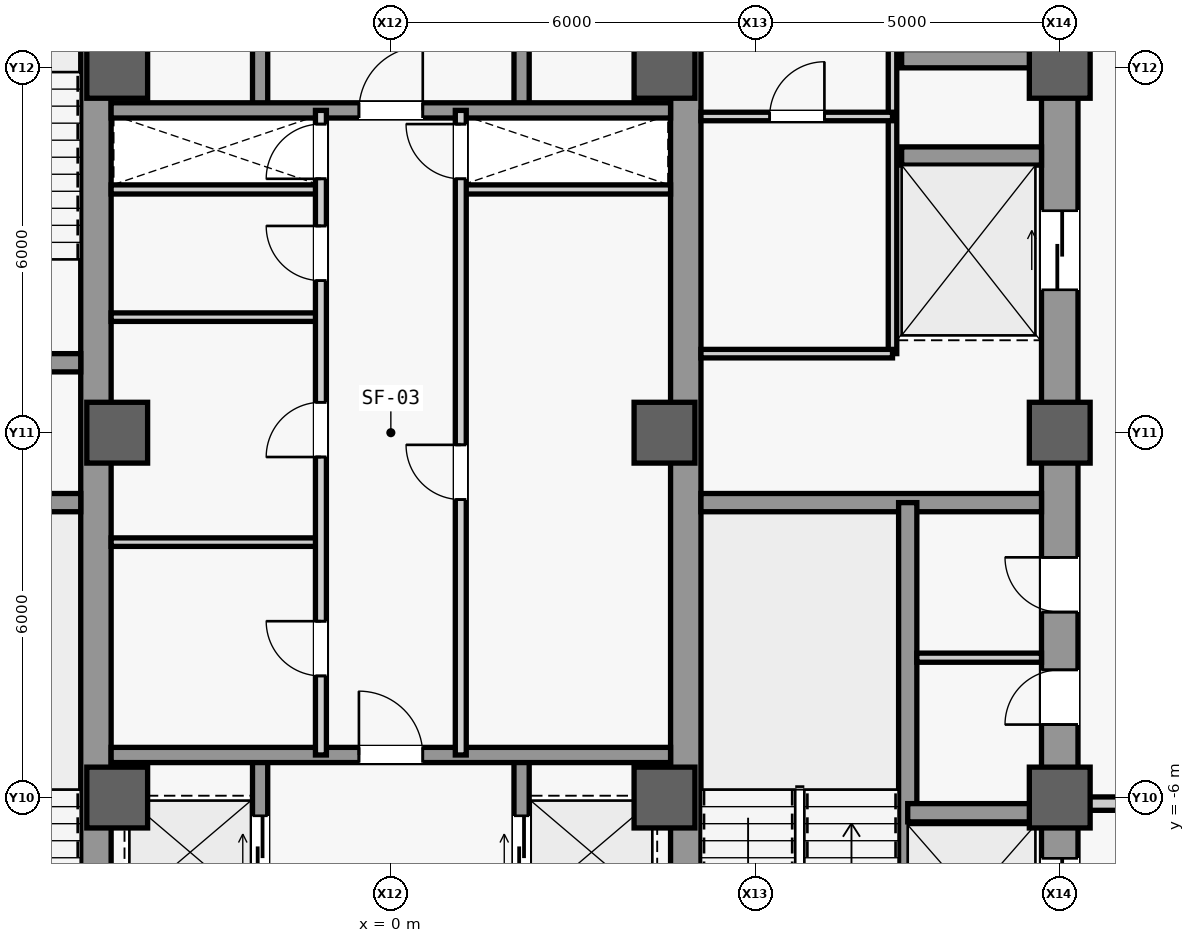
"""IFC4 building model, lengths in metres.
Left out: names, types, materials, properties, quantities, classifications, styles, units other than length and angle.
Written with IfcOpenShell. Run it as: python <this file> out.ifc"""

import sys

from ifc_helpers import new_model, si_unit, direction, frame, frame_2d, origin, origin_2d, place, context, subcontext, project, spatial, rectangle, extrude, source, transform, mapped, element, fill, save


model = new_model("IFC4")
c1 = context("Model", 3, precision=1e-05, world=origin(), true_north=direction((0.0, 1.0)))
c2 = subcontext(c1, "Body", "Model", "MODEL_VIEW")
j1 = project(units=[si_unit("LENGTHUNIT", "METRE"), si_unit("PLANEANGLEUNIT", "RADIAN")], contexts=[c1])
p1 = place(None, origin())
s1 = spatial("IfcSite", under=j1, at=p1, CompositionType="ELEMENT")
p2 = place(p1, origin())
s2 = spatial("IfcBuilding", under=s1, at=p2, CompositionType="ELEMENT")
p3 = place(p2, frame((0.0, 0.0, 32.6)))
s3 = spatial("IfcBuildingStorey", under=s2, at=p3, CompositionType="ELEMENT", Elevation=32.6)
m1 = source(origin(), c2, "Body", "SweptSolid", [
    extrude(rectangle(XDim=22.0, YDim=0.6, at=frame_2d((11.0, 0.0))), origin(), (0.0, 0.0, 1.0), 3.94),
])
p4 = place(p3, frame((11.0, -11.0, 0.0), z_axis=(0.0, 0.0, 1.0), x_axis=(0.0, 1.0, 0.0)))
e1 = element("IfcWall", 1, at=p4, inside=s3, PredefinedType="SHEAR", context=c2, shape_type="MappedRepresentation", body=[
    mapped(m1, transform((0.0, 0.0, 0.0), scale=1.0)),
])
m2 = source(origin(), c2, "Body", "SweptSolid", [
    extrude(rectangle(XDim=1.1, YDim=2.2, at=frame_2d((0.55, 1.1))), frame((0.0, 0.31, 0.0), z_axis=(0.0, -1.0, 0.0), x_axis=(1.0, 0.0, 0.0)), (0.0, 0.0, 1.0), 0.62),
])
p5 = place(p4, frame((0.8, 0.0, 0.0)))
e2 = element("IfcOpeningElement", 2, at=p5, cuts=e1, PredefinedType="OPENING", context=c2, shape_type="MappedRepresentation", body=[
    mapped(m2, transform((0.0, 0.0, 0.0), scale=1.0)),
])
m3 = source(origin(), c2, "Body", "SweptSolid", [
    extrude(rectangle(XDim=0.9, YDim=2.15, at=frame_2d((0.45, 1.075))), frame((0.0, 0.31, 0.0), z_axis=(0.0, -1.0, 0.0), x_axis=(1.0, 0.0, 0.0)), (0.0, 0.0, 1.0), 0.62),
])
p6 = place(p4, frame((6.2, 0.0, 0.0)))
e3 = element("IfcOpeningElement", 3, at=p6, cuts=e1, PredefinedType="OPENING", context=c2, shape_type="MappedRepresentation", body=[
    mapped(m3, transform((0.0, 0.0, 0.0), scale=1.0)),
])
p7 = place(p4, frame((8.05, 0.0, 0.0)))
e4 = element("IfcOpeningElement", 4, at=p7, cuts=e1, PredefinedType="OPENING", context=c2, shape_type="MappedRepresentation", body=[
    mapped(m3, transform((0.0, 0.0, 0.0), scale=1.0)),
])
m4 = source(origin(), c2, "Body", "SweptSolid", [
    extrude(rectangle(XDim=1.3, YDim=2.3, at=frame_2d((0.65, 1.15))), frame((0.0, 0.31, 0.0), z_axis=(0.0, -1.0, 0.0), x_axis=(1.0, 0.0, 0.0)), (0.0, 0.0, 1.0), 0.62),
])
p8 = place(p4, frame((2.7, 0.0, 0.0)))
e5 = element("IfcOpeningElement", 5, at=p8, cuts=e1, PredefinedType="OPENING", context=c2, shape_type="MappedRepresentation", body=[
    mapped(m4, transform((0.0, 0.0, 0.0), scale=1.0)),
])
p9 = place(p4, frame((13.35, 0.0, 0.0)))
e6 = element("IfcOpeningElement", 6, at=p9, cuts=e1, PredefinedType="OPENING", context=c2, shape_type="MappedRepresentation", body=[
    mapped(m4, transform((0.0, 0.0, 0.0), scale=1.0)),
])
m5 = source(origin(), c2, "Body", "SweptSolid", [
    extrude(rectangle(XDim=21.4, YDim=0.5, at=frame_2d((10.7, 0.0))), origin(), (0.0, 0.0, 1.0), 3.94),
])
for number, where, z_axis, x_axis in (
    (7, (-4.85, -10.7, 0.0), (0.0, 0.0, 1.0), (0.0, 1.0, 0.0)),
    (8, (4.85, -10.7, 0.0), (0.0, 0.0, 1.0), (0.0, 1.0, 0.0)),
):
    element("IfcWall", number, at=place(p3, frame(where, z_axis=z_axis, x_axis=x_axis)), inside=s3, PredefinedType="SHEAR", context=c2, shape_type="MappedRepresentation", body=[
        mapped(m5, transform((0.0, 0.0, 0.0), scale=1.0)),
    ])
m6 = source(origin(), c2, "Body", "SweptSolid", [
    extrude(rectangle(XDim=5.6, YDim=0.3, at=frame_2d((2.8, 0.0))), origin(), (0.0, 0.0, 1.0), 3.94),
])
for number, where, z_axis, x_axis in (
    (9, (-10.7, -1.15, 0.0), (0.0, 0.0, 1.0), (1.0, 0.0, 0.0)),
    (10, (-10.7, 1.15, 0.0), (0.0, 0.0, 1.0), (1.0, 0.0, 0.0)),
    (11, (5.1, -1.15, 0.0), (0.0, 0.0, 1.0), (1.0, 0.0, 0.0)),
):
    element("IfcWall", number, at=place(p3, frame(where, z_axis=z_axis, x_axis=x_axis)), inside=s3, PredefinedType="SHEAR", context=c2, shape_type="MappedRepresentation", body=[
        mapped(m6, transform((0.0, 0.0, 0.0), scale=1.0)),
    ])
m7 = source(origin(), c2, "Body", "SweptSolid", [
    extrude(rectangle(XDim=1.0, YDim=1.0, at=origin_2d()), origin(), (0.0, 0.0, 1.0), 4.2),
])
for number, where, z_axis, x_axis in (
    (12, (-4.5, -6.0, 0.0), (0.0, 0.0, 1.0), (1.0, 0.0, 0.0)),
    (13, (-4.5, 0.0, 0.0), (0.0, 0.0, 1.0), (1.0, 0.0, 0.0)),
    (14, (-4.5, 6.0, 0.0), (0.0, 0.0, 1.0), (1.0, 0.0, 0.0)),
    (15, (4.5, -6.0, 0.0), (0.0, 0.0, 1.0), (1.0, 0.0, 0.0)),
    (16, (4.5, 0.0, 0.0), (0.0, 0.0, 1.0), (1.0, 0.0, 0.0)),
    (17, (4.5, 6.0, 0.0), (0.0, 0.0, 1.0), (1.0, 0.0, 0.0)),
    (18, (11.0, -6.0, 0.0), (0.0, 0.0, 1.0), (1.0, 0.0, 0.0)),
    (19, (11.0, 0.0, 0.0), (0.0, 0.0, 1.0), (1.0, 0.0, 0.0)),
    (20, (11.0, 6.0, 0.0), (0.0, 0.0, 1.0), (1.0, 0.0, 0.0)),
):
    element("IfcColumn", number, at=place(p3, frame(where, z_axis=z_axis, x_axis=x_axis)), inside=s3, PredefinedType="COLUMN", context=c2, shape_type="MappedRepresentation", body=[
        mapped(m7, transform((0.0, 0.0, 0.0), scale=1.0)),
    ])
m8 = source(origin(), c2, "Body", "SweptSolid", [
    extrude(rectangle(XDim=7.8, YDim=0.3, at=frame_2d((3.9, 0.0))), origin(), (0.0, 0.0, 1.0), 3.94),
])
p10 = place(p3, frame((8.5, -8.95, 0.0), z_axis=(0.0, 0.0, 1.0), x_axis=(0.0, 1.0, 0.0)))
e21 = element("IfcWall", 21, at=p10, inside=s3, PredefinedType="SHEAR", context=c2, shape_type="MappedRepresentation", body=[
    mapped(m8, transform((0.0, 0.0, 0.0), scale=1.0)),
])
m9 = source(origin(), c2, "Body", "SweptSolid", [
    extrude(rectangle(XDim=2.2, YDim=0.3, at=frame_2d((1.1, 0.0))), origin(), (0.0, 0.0, 1.0), 3.94),
])
p11 = place(p3, frame((8.5, -6.25, 0.0), z_axis=(0.0, 0.0, 1.0), x_axis=(1.0, 0.0, 0.0)))
e22 = element("IfcWall", 22, at=p11, inside=s3, PredefinedType="SHEAR", context=c2, shape_type="MappedRepresentation", body=[
    mapped(m9, transform((0.0, 0.0, 0.0), scale=1.0)),
])
m10 = source(origin(), c2, "Body", "SweptSolid", [
    extrude(rectangle(XDim=2.3, YDim=0.3, at=frame_2d((1.15, 0.0))), origin(), (0.0, 0.0, 1.0), 3.94),
])
for number, where, z_axis, x_axis in (
    (23, (8.4, 4.55, 0.0), (0.0, 0.0, 1.0), (1.0, 0.0, 0.0)),
    (24, (8.4, 6.15, 0.0), (0.0, 0.0, 1.0), (1.0, 0.0, 0.0)),
):
    element("IfcWall", number, at=place(p3, frame(where, z_axis=z_axis, x_axis=x_axis)), inside=s3, PredefinedType="SHEAR", context=c2, shape_type="MappedRepresentation", body=[
        mapped(m10, transform((0.0, 0.0, 0.0), scale=1.0)),
    ])
m11 = source(origin(), c2, "Body", "SweptSolid", [
    extrude(rectangle(XDim=2.05, YDim=0.15, at=frame_2d((1.025, 0.0))), origin(), (0.0, 0.0, 1.0), 3.94),
])
p12 = place(p3, frame((8.65, -3.7, 0.0), z_axis=(0.0, 0.0, 1.0), x_axis=(1.0, 0.0, 0.0)))
e25 = element("IfcWall", 25, at=p12, inside=s3, PredefinedType="PARTITIONING", context=c2, shape_type="MappedRepresentation", body=[
    mapped(m11, transform((0.0, 0.0, 0.0), scale=1.0)),
])
m12 = source(origin(), c2, "Body", "SweptSolid", [
    extrude(rectangle(XDim=9.4, YDim=0.14, at=frame_2d((4.7, 0.0))), origin(), (0.0, 0.0, 1.0), 3.94),
])
p13 = place(p3, frame((8.25, 1.3, 0.0), z_axis=(0.0, 0.0, 1.0), x_axis=(0.0, 1.0, 0.0)))
e26 = element("IfcWall", 26, at=p13, inside=s3, PredefinedType="PARTITIONING", context=c2, shape_type="MappedRepresentation", body=[
    mapped(m12, transform((0.0, 0.0, 0.0), scale=1.0)),
])
m13 = source(origin(), c2, "Body", "SweptSolid", [
    extrude(rectangle(XDim=3.15, YDim=0.14, at=frame_2d((1.575, 0.0))), origin(), (0.0, 0.0, 1.0), 3.94),
])
p14 = place(p3, frame((5.1, 1.3, 0.0), z_axis=(0.0, 0.0, 1.0), x_axis=(1.0, 0.0, 0.0)))
e27 = element("IfcWall", 27, at=p14, inside=s3, PredefinedType="PARTITIONING", context=c2, shape_type="MappedRepresentation", body=[
    mapped(m13, transform((0.0, 0.0, 0.0), scale=1.0)),
])
p15 = place(p3, frame((5.1, 5.2, 0.0), z_axis=(0.0, 0.0, 1.0), x_axis=(1.0, 0.0, 0.0)))
e28 = element("IfcWall", 28, at=p15, inside=s3, PredefinedType="PARTITIONING", context=c2, shape_type="MappedRepresentation", body=[
    mapped(m13, transform((0.0, 0.0, 0.0), scale=1.0)),
])
m14 = source(origin(), c2, "Body", "SweptSolid", [
    extrude(rectangle(XDim=0.9, YDim=2.15, at=frame_2d((0.45, 1.075))), frame((0.0, 0.08, 0.0), z_axis=(0.0, -1.0, 0.0), x_axis=(1.0, 0.0, 0.0)), (0.0, 0.0, 1.0), 0.16),
])
p16 = place(p15, frame((1.13, 0.0, 0.0)))
e29 = element("IfcOpeningElement", 29, at=p16, cuts=e28, PredefinedType="OPENING", context=c2, shape_type="MappedRepresentation", body=[
    mapped(m14, transform((0.0, 0.0, 0.0), scale=1.0)),
])
m15 = source(origin(), c2, "Body", "SweptSolid", [
    extrude(rectangle(XDim=4.05, YDim=0.22, at=frame_2d((2.025, 0.0))), origin(), (0.0, 0.0, 1.0), 3.085),
])
p17 = place(p3, frame((11.3, -6.1, 0.0), z_axis=(0.0, 0.0, 1.0), x_axis=(1.0, 0.0, 0.0)))
e30 = element("IfcWall", 30, at=p17, inside=s3, PredefinedType="PARTITIONING", context=c2, shape_type="MappedRepresentation", body=[
    mapped(m15, transform((0.0, 0.0, 0.0), scale=1.0)),
])
m16 = source(origin(), c2, "Body", "SweptSolid", [
    extrude(rectangle(XDim=3.45, YDim=0.15, at=frame_2d((1.725, 0.0))), origin(), (0.0, 0.0, 1.0), 3.94),
])
for number, where, z_axis, x_axis in (
    (31, (-4.6, 4.0, 0.0), (0.0, 0.0, 1.0), (1.0, 0.0, 0.0)),
    (32, (1.15, 4.0, 0.0), (0.0, 0.0, 1.0), (1.0, 0.0, 0.0)),
):
    element("IfcWall", number, at=place(p3, frame(where, z_axis=z_axis, x_axis=x_axis)), inside=s3, PredefinedType="PARTITIONING", context=c2, shape_type="MappedRepresentation", body=[
        mapped(m16, transform((0.0, 0.0, 0.0), scale=1.0)),
    ])
m17 = source(origin(), c2, "Body", "SweptSolid", [
    extrude(rectangle(XDim=5.4, YDim=0.25, at=frame_2d((2.7, 0.0))), origin(), (0.0, 0.0, 1.0), 3.94),
])
p18 = place(p3, frame((-2.15, -10.7, 0.0), z_axis=(0.0, 0.0, 1.0), x_axis=(0.0, 1.0, 0.0)))
e33 = element("IfcWall", 33, at=p18, inside=s3, PredefinedType="SHEAR", context=c2, shape_type="MappedRepresentation", body=[
    mapped(m17, transform((0.0, 0.0, 0.0), scale=1.0)),
])
m18 = source(origin(), c2, "Body", "SweptSolid", [
    extrude(rectangle(XDim=1.2, YDim=2.3, at=frame_2d((0.6, 1.15))), frame((0.0, 0.135, 0.0), z_axis=(0.0, -1.0, 0.0), x_axis=(1.0, 0.0, 0.0)), (0.0, 0.0, 1.0), 0.27),
])
p19 = place(p18, frame((0.9, 0.0, 0.0)))
e34 = element("IfcOpeningElement", 34, at=p19, cuts=e33, PredefinedType="OPENING", context=c2, shape_type="MappedRepresentation", body=[
    mapped(m18, transform((0.0, 0.0, 0.0), scale=1.0)),
])
p20 = place(p18, frame((3.2, 0.0, 0.0)))
e35 = element("IfcOpeningElement", 35, at=p20, cuts=e33, PredefinedType="OPENING", context=c2, shape_type="MappedRepresentation", body=[
    mapped(m18, transform((0.0, 0.0, 0.0), scale=1.0)),
])
p21 = place(p3, frame((2.15, -10.7, 0.0), z_axis=(0.0, 0.0, 1.0), x_axis=(0.0, 1.0, 0.0)))
e36 = element("IfcWall", 36, at=p21, inside=s3, PredefinedType="SHEAR", context=c2, shape_type="MappedRepresentation", body=[
    mapped(m17, transform((0.0, 0.0, 0.0), scale=1.0)),
])
p22 = place(p21, frame((0.9, 0.0, 0.0)))
e37 = element("IfcOpeningElement", 37, at=p22, cuts=e36, PredefinedType="OPENING", context=c2, shape_type="MappedRepresentation", body=[
    mapped(m18, transform((0.0, 0.0, 0.0), scale=1.0)),
])
p23 = place(p21, frame((3.2, 0.0, 0.0)))
e38 = element("IfcOpeningElement", 38, at=p23, cuts=e36, PredefinedType="OPENING", context=c2, shape_type="MappedRepresentation", body=[
    mapped(m18, transform((0.0, 0.0, 0.0), scale=1.0)),
])
m19 = source(origin(), c2, "Body", "SweptSolid", [
    extrude(rectangle(XDim=9.2, YDim=0.25, at=frame_2d((4.6, 0.0))), origin(), (0.0, 0.0, 1.0), 3.94),
])
p24 = place(p3, frame((-4.6, -5.3, 0.0), z_axis=(0.0, 0.0, 1.0), x_axis=(1.0, 0.0, 0.0)))
e39 = element("IfcWall", 39, at=p24, inside=s3, PredefinedType="SHEAR", context=c2, shape_type="MappedRepresentation", body=[
    mapped(m19, transform((0.0, 0.0, 0.0), scale=1.0)),
])
m20 = source(origin(), c2, "Body", "SweptSolid", [
    extrude(rectangle(XDim=1.05, YDim=2.2, at=frame_2d((0.525, 1.1))), frame((0.0, 0.135, 0.0), z_axis=(0.0, -1.0, 0.0), x_axis=(1.0, 0.0, 0.0)), (0.0, 0.0, 1.0), 0.27),
])
p25 = place(p24, frame((4.075, 0.0, 0.0)))
e40 = element("IfcOpeningElement", 40, at=p25, cuts=e39, PredefinedType="OPENING", context=c2, shape_type="MappedRepresentation", body=[
    mapped(m20, transform((0.0, 0.0, 0.0), scale=1.0)),
])
for number, where, z_axis, x_axis in (
    (41, (-2.15, 5.3, 0.0), (0.0, 0.0, 1.0), (0.0, 1.0, 0.0)),
    (42, (2.15, 5.3, 0.0), (0.0, 0.0, 1.0), (0.0, 1.0, 0.0)),
):
    element("IfcWall", number, at=place(p3, frame(where, z_axis=z_axis, x_axis=x_axis)), inside=s3, PredefinedType="SHEAR", context=c2, shape_type="MappedRepresentation", body=[
        mapped(m17, transform((0.0, 0.0, 0.0), scale=1.0)),
    ])
p26 = place(p3, frame((-4.6, 5.3, 0.0), z_axis=(0.0, 0.0, 1.0), x_axis=(1.0, 0.0, 0.0)))
e43 = element("IfcWall", 43, at=p26, inside=s3, PredefinedType="SHEAR", context=c2, shape_type="MappedRepresentation", body=[
    mapped(m19, transform((0.0, 0.0, 0.0), scale=1.0)),
])
p27 = place(p26, frame((4.075, 0.0, 0.0)))
e44 = element("IfcOpeningElement", 44, at=p27, cuts=e43, PredefinedType="OPENING", context=c2, shape_type="MappedRepresentation", body=[
    mapped(m20, transform((0.0, 0.0, 0.0), scale=1.0)),
])
m21 = source(origin(), c2, "Body", "SweptSolid", [
    extrude(rectangle(XDim=3.45, YDim=0.14, at=frame_2d((1.725, 0.0))), origin(), (0.0, 0.0, 1.0), 3.94),
])
for number, where, z_axis, x_axis in (
    (45, (-4.6, -1.8, 0.0), (0.0, 0.0, 1.0), (1.0, 0.0, 0.0)),
    (46, (-4.6, 1.9, 0.0), (0.0, 0.0, 1.0), (1.0, 0.0, 0.0)),
):
    element("IfcWall", number, at=place(p3, frame(where, z_axis=z_axis, x_axis=x_axis)), inside=s3, PredefinedType="PARTITIONING", context=c2, shape_type="MappedRepresentation", body=[
        mapped(m21, transform((0.0, 0.0, 0.0), scale=1.0)),
    ])
m22 = source(origin(), c2, "Body", "SweptSolid", [
    extrude(rectangle(XDim=10.6, YDim=0.18, at=frame_2d((5.3, 0.0))), origin(), (0.0, 0.0, 1.0), 3.94),
])
p28 = place(p3, frame((-1.15, -5.3, 0.0), z_axis=(0.0, 0.0, 1.0), x_axis=(0.0, 1.0, 0.0)))
e47 = element("IfcWall", 47, at=p28, inside=s3, PredefinedType="PARTITIONING", context=c2, shape_type="MappedRepresentation", body=[
    mapped(m22, transform((0.0, 0.0, 0.0), scale=1.0)),
])
m23 = source(origin(), c2, "Body", "SweptSolid", [
    extrude(rectangle(XDim=0.9, YDim=2.15, at=frame_2d((0.45, 1.075))), frame((0.0, 0.1, 0.0), z_axis=(0.0, -1.0, 0.0), x_axis=(1.0, 0.0, 0.0)), (0.0, 0.0, 1.0), 0.2),
])
p29 = place(p28, frame((1.3, 0.0, 0.0)))
e48 = element("IfcOpeningElement", 48, at=p29, cuts=e47, PredefinedType="OPENING", context=c2, shape_type="MappedRepresentation", body=[
    mapped(m23, transform((0.0, 0.0, 0.0), scale=1.0)),
])
p30 = place(p28, frame((4.9, 0.0, 0.0)))
e49 = element("IfcOpeningElement", 49, at=p30, cuts=e47, PredefinedType="OPENING", context=c2, shape_type="MappedRepresentation", body=[
    mapped(m23, transform((0.0, 0.0, 0.0), scale=1.0)),
])
p31 = place(p28, frame((7.8, 0.0, 0.0)))
e50 = element("IfcOpeningElement", 50, at=p31, cuts=e47, PredefinedType="OPENING", context=c2, shape_type="MappedRepresentation", body=[
    mapped(m23, transform((0.0, 0.0, 0.0), scale=1.0)),
])
p32 = place(p28, frame((9.475, 0.0, 0.0)))
e51 = element("IfcOpeningElement", 51, at=p32, cuts=e47, PredefinedType="OPENING", context=c2, shape_type="MappedRepresentation", body=[
    mapped(m23, transform((0.0, 0.0, 0.0), scale=1.0)),
])
p33 = place(p3, frame((1.15, -5.3, 0.0), z_axis=(0.0, 0.0, 1.0), x_axis=(0.0, 1.0, 0.0)))
e52 = element("IfcWall", 52, at=p33, inside=s3, PredefinedType="PARTITIONING", context=c2, shape_type="MappedRepresentation", body=[
    mapped(m22, transform((0.0, 0.0, 0.0), scale=1.0)),
])
p34 = place(p33, frame((4.2, 0.0, 0.0)))
e53 = element("IfcOpeningElement", 53, at=p34, cuts=e52, PredefinedType="OPENING", context=c2, shape_type="MappedRepresentation", body=[
    mapped(m23, transform((0.0, 0.0, 0.0), scale=1.0)),
])
p35 = place(p33, frame((9.475, 0.0, 0.0)))
e54 = element("IfcOpeningElement", 54, at=p35, cuts=e52, PredefinedType="OPENING", context=c2, shape_type="MappedRepresentation", body=[
    mapped(m23, transform((0.0, 0.0, 0.0), scale=1.0)),
])
m24 = source(origin(), c2, "Body", "SweptSolid", [
    extrude(rectangle(XDim=0.9, YDim=2.15, at=frame_2d((0.45, 1.075))), frame((0.0, 0.025, 0.0), z_axis=(0.0, -1.0, 0.0), x_axis=(1.0, 0.0, 0.0)), (0.0, 0.0, 1.0), 0.05),
])
p36 = place(p6, origin())
e55 = element("IfcDoor", 55, at=p36, inside=s3, OperationType="SINGLE_SWING_LEFT", PredefinedType="DOOR", context=c2, shape_type="MappedRepresentation", body=[
    mapped(m24, transform((0.0, 0.0, 0.0), scale=1.0)),
])
fill(e3, e55)
p37 = place(p7, origin())
e56 = element("IfcDoor", 56, at=p37, inside=s3, OperationType="SINGLE_SWING_RIGHT", PredefinedType="DOOR", context=c2, shape_type="MappedRepresentation", body=[
    mapped(m24, transform((0.0, 0.0, 0.0), scale=1.0)),
])
fill(e4, e56)
p38 = place(p16, origin())
e57 = element("IfcDoor", 57, at=p38, inside=s3, OperationType="SINGLE_SWING_RIGHT", PredefinedType="DOOR", context=c2, shape_type="MappedRepresentation", body=[
    mapped(m24, transform((0.0, 0.0, 0.0), scale=1.0)),
])
fill(e29, e57)
m25 = source(origin(), c2, "Body", "SweptSolid", [
    extrude(rectangle(XDim=1.05, YDim=2.2, at=frame_2d((0.525, 1.1))), frame((0.0, 0.025, 0.0), z_axis=(0.0, -1.0, 0.0), x_axis=(1.0, 0.0, 0.0)), (0.0, 0.0, 1.0), 0.05),
])
p39 = place(p25, origin())
e58 = element("IfcDoor", 58, at=p39, inside=s3, OperationType="SINGLE_SWING_LEFT", PredefinedType="DOOR", context=c2, shape_type="MappedRepresentation", body=[
    mapped(m25, transform((0.0, 0.0, 0.0), scale=1.0)),
])
fill(e40, e58)
p40 = place(p27, origin())
e59 = element("IfcDoor", 59, at=p40, inside=s3, OperationType="SINGLE_SWING_RIGHT", PredefinedType="DOOR", context=c2, shape_type="MappedRepresentation", body=[
    mapped(m25, transform((0.0, 0.0, 0.0), scale=1.0)),
])
fill(e44, e59)
p41 = place(p29, origin())
e60 = element("IfcDoor", 60, at=p41, inside=s3, OperationType="SINGLE_SWING_RIGHT", PredefinedType="DOOR", context=c2, shape_type="MappedRepresentation", body=[
    mapped(m24, transform((0.0, 0.0, 0.0), scale=1.0)),
])
fill(e48, e60)
p42 = place(p30, origin())
e61 = element("IfcDoor", 61, at=p42, inside=s3, OperationType="SINGLE_SWING_LEFT", PredefinedType="DOOR", context=c2, shape_type="MappedRepresentation", body=[
    mapped(m24, transform((0.0, 0.0, 0.0), scale=1.0)),
])
fill(e49, e61)
p43 = place(p31, origin())
e62 = element("IfcDoor", 62, at=p43, inside=s3, OperationType="SINGLE_SWING_RIGHT", PredefinedType="DOOR", context=c2, shape_type="MappedRepresentation", body=[
    mapped(m24, transform((0.0, 0.0, 0.0), scale=1.0)),
])
fill(e50, e62)
p44 = place(p34, origin())
e63 = element("IfcDoor", 63, at=p44, inside=s3, OperationType="SINGLE_SWING_RIGHT", PredefinedType="DOOR", context=c2, shape_type="MappedRepresentation", body=[
    mapped(m24, transform((0.0, 0.0, 0.0), scale=1.0)),
])
fill(e53, e63)
p45 = place(p32, origin())
e64 = element("IfcDoor", 64, at=p45, inside=s3, OperationType="SINGLE_SWING_LEFT", PredefinedType="DOOR", context=c2, shape_type="MappedRepresentation", body=[
    mapped(m24, transform((0.0, 0.0, 0.0), scale=1.0)),
])
fill(e51, e64)
p46 = place(p35, origin())
e65 = element("IfcDoor", 65, at=p46, inside=s3, OperationType="SINGLE_SWING_RIGHT", PredefinedType="DOOR", context=c2, shape_type="MappedRepresentation", body=[
    mapped(m24, transform((0.0, 0.0, 0.0), scale=1.0)),
])
fill(e54, e65)
m26 = source(origin(), c2, "Body", "SweptSolid", [
    extrude(rectangle(XDim=1.2, YDim=2.3, at=frame_2d((0.6, 1.15))), frame((0.0, 0.025, 0.0), z_axis=(0.0, -1.0, 0.0), x_axis=(1.0, 0.0, 0.0)), (0.0, 0.0, 1.0), 0.05),
])
p47 = place(p20, origin())
e66 = element("IfcDoor", 66, at=p47, inside=s3, OperationType="SLIDING_TO_LEFT", PredefinedType="DOOR", context=c2, shape_type="MappedRepresentation", body=[
    mapped(m26, transform((0.0, 0.0, 0.0), scale=1.0)),
])
fill(e35, e66)
p48 = place(p23, origin())
e67 = element("IfcDoor", 67, at=p48, inside=s3, OperationType="SLIDING_TO_LEFT", PredefinedType="DOOR", context=c2, shape_type="MappedRepresentation", body=[
    mapped(m26, transform((0.0, 0.0, 0.0), scale=1.0)),
])
fill(e38, e67)
m27 = source(origin(), c2, "Body", "SweptSolid", [
    extrude(rectangle(XDim=1.3, YDim=2.3, at=frame_2d((0.65, 1.15))), frame((0.0, 0.025, 0.0), z_axis=(0.0, -1.0, 0.0), x_axis=(1.0, 0.0, 0.0)), (0.0, 0.0, 1.0), 0.05),
])
p49 = place(p8, origin())
e68 = element("IfcDoor", 68, at=p49, inside=s3, OperationType="SLIDING_TO_LEFT", PredefinedType="DOOR", context=c2, shape_type="MappedRepresentation", body=[
    mapped(m27, transform((0.0, 0.0, 0.0), scale=1.0)),
])
fill(e5, e68)
p50 = place(p9, origin())
e69 = element("IfcDoor", 69, at=p50, inside=s3, OperationType="SLIDING_TO_LEFT", PredefinedType="DOOR", context=c2, shape_type="MappedRepresentation", body=[
    mapped(m27, transform((0.0, 0.0, 0.0), scale=1.0)),
])
fill(e6, e69)
save(model, sys.argv[1])
